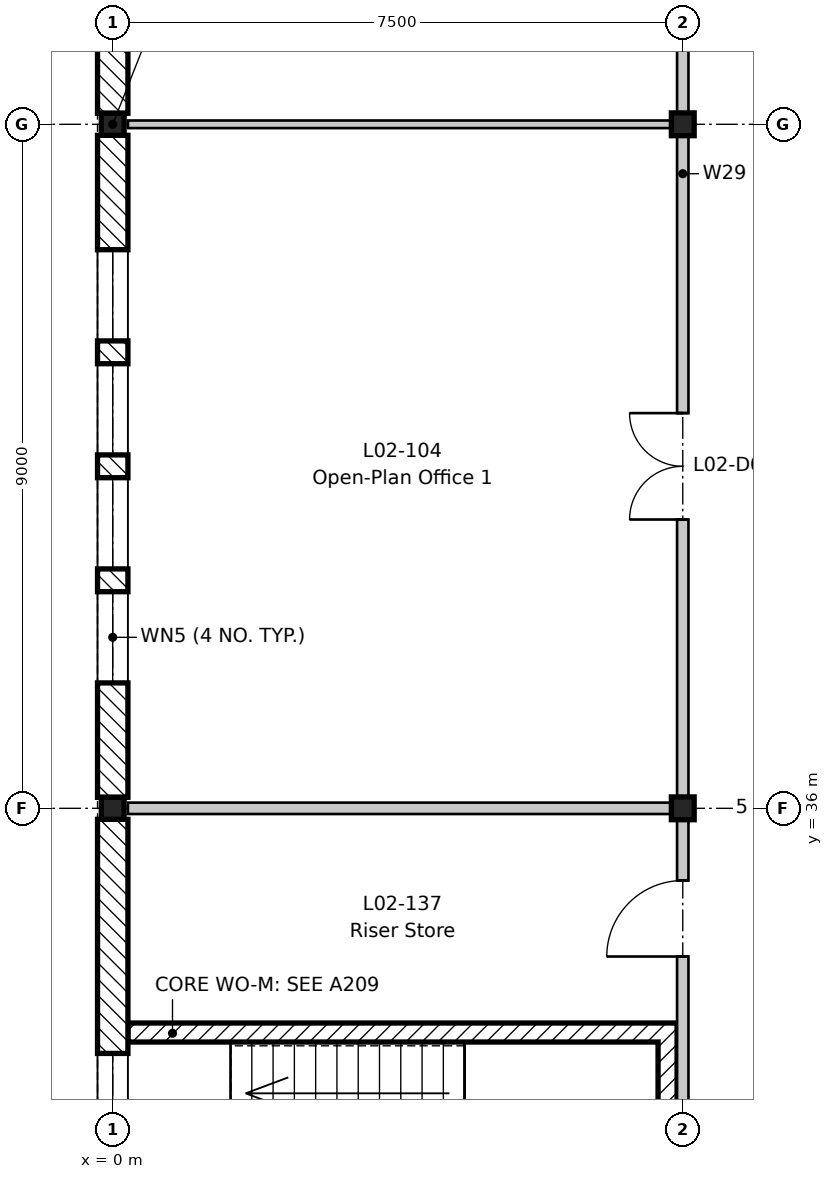
"""IFC4 building model, lengths in metres.
Left out: names, types, materials, properties, quantities, classifications, styles, units other than length and angle.
Written with IfcOpenShell. Run it as: python <this file> out.ifc"""

import sys

from ifc_helpers import new_model, si_unit, direction, frame, frame_2d, origin, origin_2d, place, context, subcontext, project, spatial, rectangle, i_section, extrude, element, fill, save


model = new_model("IFC4")
c1 = context("Model", 3, precision=1e-05, world=origin(), true_north=direction((0.0, 1.0)))
c2 = subcontext(c1, "Body", "Model", "MODEL_VIEW")
j1 = project(units=[si_unit("LENGTHUNIT", "METRE"), si_unit("PLANEANGLEUNIT", "RADIAN")], contexts=[c1])
p1 = place(None, origin())
s1 = spatial("IfcSite", under=j1, at=p1, CompositionType="ELEMENT")
p2 = place(p1, origin())
s2 = spatial("IfcBuilding", under=s1, at=p2, CompositionType="ELEMENT")
p3 = place(p2, frame((0.0, 0.0, 9.9)))
s3 = spatial("IfcBuildingStorey", under=s2, at=p3, CompositionType="ELEMENT", Elevation=9.9)
for number, where, z_axis, x_axis in (
    (1, (0.0, 36.0, -0.2), (0.0, 0.0, 1.0), (1.0, 0.0, 0.0)),
    (2, (0.0, 45.0, -0.2), (0.0, 0.0, 1.0), (1.0, 0.0, 0.0)),
):
    element("IfcColumn", number, at=place(p3, frame(where, z_axis=z_axis, x_axis=x_axis)), inside=s3, PredefinedType="COLUMN", context=c2, shape_type="SweptSolid", body=[
        extrude(i_section(OverallWidth=0.3, OverallDepth=0.29, WebThickness=0.009, FlangeThickness=0.014, FilletRadius=0.027, at=origin_2d()), origin(), (0.0, 0.0, 1.0), 4.5),
    ])
for number, where, z_axis, x_axis in (
    (3, (7.5, 36.0, -0.2), (0.0, 0.0, 1.0), (1.0, 0.0, 0.0)),
    (4, (7.5, 45.0, -0.2), (0.0, 0.0, 1.0), (1.0, 0.0, 0.0)),
):
    element("IfcColumn", number, at=place(p3, frame(where, z_axis=z_axis, x_axis=x_axis)), inside=s3, PredefinedType="COLUMN", context=c2, shape_type="SweptSolid", body=[
        extrude(i_section(OverallWidth=0.3, OverallDepth=0.3, WebThickness=0.011, FlangeThickness=0.019, FilletRadius=0.027, at=origin_2d()), origin(), (0.0, 0.0, 1.0), 4.5),
    ])
p4 = place(p3, frame((0.2, 33.05, 0.0), z_axis=(0.0, 0.0, 1.0), x_axis=(1.0, 0.0, 0.0)))
e5 = element("IfcWall", 5, at=p4, inside=s3, PredefinedType="SHEAR", context=c2, shape_type="SweptSolid", body=[
    extrude(rectangle(XDim=7.225, YDim=0.25, at=frame_2d((3.613, 0.0))), origin(), (0.0, 0.0, 1.0), 4.3),
])
p5 = place(p3, frame((7.3, 30.075, 0.0), z_axis=(0.0, 0.0, 1.0), x_axis=(0.0, 1.0, 0.0)))
e6 = element("IfcWall", 6, at=p5, inside=s3, PredefinedType="SHEAR", context=c2, shape_type="SweptSolid", body=[
    extrude(rectangle(XDim=2.85, YDim=0.25, at=frame_2d((1.425, 0.0))), origin(), (0.0, 0.0, 1.0), 4.3),
])
p6 = place(p3, frame((0.0, 27.145, 0.0), z_axis=(0.0, 0.0, 1.0), x_axis=(0.0, 1.0, 0.0)))
e7 = element("IfcWall", 7, at=p6, inside=s3, PredefinedType="STANDARD", context=c2, shape_type="SweptSolid", body=[
    extrude(rectangle(XDim=8.71, YDim=0.4, at=frame_2d((4.355, 0.0))), origin(), (0.0, 0.0, 1.0), 3.9),
])
p7 = place(p6, frame((3.08, 0.0, 0.9)))
e8 = element("IfcOpeningElement", 8, at=p7, cuts=e7, PredefinedType="OPENING", context=c2, shape_type="SweptSolid", body=[
    extrude(rectangle(XDim=1.05, YDim=2.7, at=frame_2d((0.525, 1.35))), frame((0.0, 0.21, 0.0), z_axis=(0.0, -1.0, 0.0), x_axis=(1.0, 0.0, 0.0)), (0.0, 0.0, 1.0), 0.42),
])
p8 = place(p6, frame((4.58, 0.0, 0.9)))
e9 = element("IfcOpeningElement", 9, at=p8, cuts=e7, PredefinedType="OPENING", context=c2, shape_type="SweptSolid", body=[
    extrude(rectangle(XDim=1.05, YDim=2.7, at=frame_2d((0.525, 1.35))), frame((0.0, 0.21, 0.0), z_axis=(0.0, -1.0, 0.0), x_axis=(1.0, 0.0, 0.0)), (0.0, 0.0, 1.0), 0.42),
])
p9 = place(p3, frame((0.0, 36.145, 0.0), z_axis=(0.0, 0.0, 1.0), x_axis=(0.0, 1.0, 0.0)))
e10 = element("IfcWall", 10, at=p9, inside=s3, PredefinedType="STANDARD", context=c2, shape_type="SweptSolid", body=[
    extrude(rectangle(XDim=8.71, YDim=0.4, at=frame_2d((4.355, 0.0))), origin(), (0.0, 0.0, 1.0), 3.9),
])
p10 = place(p9, frame((1.505, 0.0, 0.6)))
e11 = element("IfcOpeningElement", 11, at=p10, cuts=e10, PredefinedType="OPENING", context=c2, shape_type="SweptSolid", body=[
    extrude(rectangle(XDim=1.2, YDim=3.0, at=frame_2d((0.6, 1.5))), frame((0.0, 0.21, 0.0), z_axis=(0.0, -1.0, 0.0), x_axis=(1.0, 0.0, 0.0)), (0.0, 0.0, 1.0), 0.42),
])
p11 = place(p9, frame((3.005, 0.0, 0.6)))
e12 = element("IfcOpeningElement", 12, at=p11, cuts=e10, PredefinedType="OPENING", context=c2, shape_type="SweptSolid", body=[
    extrude(rectangle(XDim=1.2, YDim=3.0, at=frame_2d((0.6, 1.5))), frame((0.0, 0.21, 0.0), z_axis=(0.0, -1.0, 0.0), x_axis=(1.0, 0.0, 0.0)), (0.0, 0.0, 1.0), 0.42),
])
p12 = place(p9, frame((4.505, 0.0, 0.6)))
e13 = element("IfcOpeningElement", 13, at=p12, cuts=e10, PredefinedType="OPENING", context=c2, shape_type="SweptSolid", body=[
    extrude(rectangle(XDim=1.2, YDim=3.0, at=frame_2d((0.6, 1.5))), frame((0.0, 0.21, 0.0), z_axis=(0.0, -1.0, 0.0), x_axis=(1.0, 0.0, 0.0)), (0.0, 0.0, 1.0), 0.42),
])
p13 = place(p9, frame((6.005, 0.0, 0.6)))
e14 = element("IfcOpeningElement", 14, at=p13, cuts=e10, PredefinedType="OPENING", context=c2, shape_type="SweptSolid", body=[
    extrude(rectangle(XDim=1.2, YDim=3.0, at=frame_2d((0.6, 1.5))), frame((0.0, 0.21, 0.0), z_axis=(0.0, -1.0, 0.0), x_axis=(1.0, 0.0, 0.0)), (0.0, 0.0, 1.0), 0.42),
])
p14 = place(p3, frame((0.0, 45.145, 0.0), z_axis=(0.0, 0.0, 1.0), x_axis=(0.0, 1.0, 0.0)))
e15 = element("IfcWall", 15, at=p14, inside=s3, PredefinedType="STANDARD", context=c2, shape_type="SweptSolid", body=[
    extrude(rectangle(XDim=8.71, YDim=0.4, at=frame_2d((4.355, 0.0))), origin(), (0.0, 0.0, 1.0), 3.9),
])
p15 = place(p3, frame((0.2, 36.0, 0.0), z_axis=(0.0, 0.0, 1.0), x_axis=(1.0, 0.0, 0.0)))
e16 = element("IfcWall", 16, at=p15, inside=s3, PredefinedType="PARTITIONING", context=c2, shape_type="SweptSolid", body=[
    extrude(rectangle(XDim=7.225, YDim=0.15, at=frame_2d((3.613, 0.0))), origin(), (0.0, 0.0, 1.0), 3.95),
])
p16 = place(p3, frame((0.2, 45.0, 0.0), z_axis=(0.0, 0.0, 1.0), x_axis=(1.0, 0.0, 0.0)))
e17 = element("IfcWall", 17, at=p16, inside=s3, PredefinedType="PARTITIONING", context=c2, shape_type="SweptSolid", body=[
    extrude(rectangle(XDim=7.225, YDim=0.1, at=frame_2d((3.613, 0.0))), origin(), (0.0, 0.0, 1.0), 3.95),
])
p17 = place(p3, frame((7.5, -8.8, 0.0), z_axis=(0.0, 0.0, 1.0), x_axis=(0.0, 1.0, 0.0)))
e18 = element("IfcWall", 18, at=p17, inside=s3, PredefinedType="PARTITIONING", context=c2, shape_type="SweptSolid", body=[
    extrude(rectangle(XDim=79.3, YDim=0.15, at=frame_2d((39.65, 0.0))), origin(), (0.0, 0.0, 1.0), 3.78),
])
p18 = place(p17, frame((21.6, 0.0, 0.0)))
e19 = element("IfcOpeningElement", 19, at=p18, cuts=e18, PredefinedType="OPENING", context=c2, shape_type="SweptSolid", body=[
    extrude(rectangle(XDim=1.4, YDim=2.1, at=frame_2d((0.7, 1.05))), frame((0.0, 0.085, 0.0), z_axis=(0.0, -1.0, 0.0), x_axis=(1.0, 0.0, 0.0)), (0.0, 0.0, 1.0), 0.17),
])
p19 = place(p17, frame((29.3, 0.0, 0.0)))
e20 = element("IfcOpeningElement", 20, at=p19, cuts=e18, PredefinedType="OPENING", context=c2, shape_type="SweptSolid", body=[
    extrude(rectangle(XDim=1.0, YDim=2.1, at=frame_2d((0.5, 1.05))), frame((0.0, 0.085, 0.0), z_axis=(0.0, -1.0, 0.0), x_axis=(1.0, 0.0, 0.0)), (0.0, 0.0, 1.0), 0.17),
])
p20 = place(p17, frame((33.8, 0.0, 0.0)))
e21 = element("IfcOpeningElement", 21, at=p20, cuts=e18, PredefinedType="OPENING", context=c2, shape_type="SweptSolid", body=[
    extrude(rectangle(XDim=1.0, YDim=2.1, at=frame_2d((0.5, 1.05))), frame((0.0, 0.085, 0.0), z_axis=(0.0, -1.0, 0.0), x_axis=(1.0, 0.0, 0.0)), (0.0, 0.0, 1.0), 0.17),
])
p21 = place(p17, frame((48.6, 0.0, 0.0)))
e22 = element("IfcOpeningElement", 22, at=p21, cuts=e18, PredefinedType="OPENING", context=c2, shape_type="SweptSolid", body=[
    extrude(rectangle(XDim=1.4, YDim=2.1, at=frame_2d((0.7, 1.05))), frame((0.0, 0.085, 0.0), z_axis=(0.0, -1.0, 0.0), x_axis=(1.0, 0.0, 0.0)), (0.0, 0.0, 1.0), 0.17),
])
p22 = place(p17, frame((56.3, 0.0, 0.0)))
e23 = element("IfcOpeningElement", 23, at=p22, cuts=e18, PredefinedType="OPENING", context=c2, shape_type="SweptSolid", body=[
    extrude(rectangle(XDim=1.0, YDim=2.1, at=frame_2d((0.5, 1.05))), frame((0.0, 0.085, 0.0), z_axis=(0.0, -1.0, 0.0), x_axis=(1.0, 0.0, 0.0)), (0.0, 0.0, 1.0), 0.17),
])
p23 = place(p17, frame((60.8, 0.0, 0.0)))
e24 = element("IfcOpeningElement", 24, at=p23, cuts=e18, PredefinedType="OPENING", context=c2, shape_type="SweptSolid", body=[
    extrude(rectangle(XDim=1.0, YDim=2.1, at=frame_2d((0.5, 1.05))), frame((0.0, 0.085, 0.0), z_axis=(0.0, -1.0, 0.0), x_axis=(1.0, 0.0, 0.0)), (0.0, 0.0, 1.0), 0.17),
])
p24 = place(p17, frame((12.6, 0.0, 0.0)))
e25 = element("IfcOpeningElement", 25, at=p24, cuts=e18, PredefinedType="OPENING", context=c2, shape_type="SweptSolid", body=[
    extrude(rectangle(XDim=1.4, YDim=2.1, at=frame_2d((0.7, 1.05))), frame((0.0, 0.085, 0.0), z_axis=(0.0, -1.0, 0.0), x_axis=(1.0, 0.0, 0.0)), (0.0, 0.0, 1.0), 0.17),
])
p25 = place(p17, frame((3.6, 0.0, 0.0)))
e26 = element("IfcOpeningElement", 26, at=p25, cuts=e18, PredefinedType="OPENING", context=c2, shape_type="SweptSolid", body=[
    extrude(rectangle(XDim=1.4, YDim=2.1, at=frame_2d((0.7, 1.05))), frame((0.0, 0.085, 0.0), z_axis=(0.0, -1.0, 0.0), x_axis=(1.0, 0.0, 0.0)), (0.0, 0.0, 1.0), 0.17),
])
p26 = place(p17, frame((63.55, 0.0, 0.0)))
e27 = element("IfcOpeningElement", 27, at=p26, cuts=e18, PredefinedType="OPENING", context=c2, shape_type="SweptSolid", body=[
    extrude(rectangle(XDim=1.4, YDim=2.1, at=frame_2d((0.7, 1.05))), frame((0.0, 0.085, 0.0), z_axis=(0.0, -1.0, 0.0), x_axis=(1.0, 0.0, 0.0)), (0.0, 0.0, 1.0), 0.17),
])
p27 = place(p17, frame((69.6, 0.0, 0.0)))
e28 = element("IfcOpeningElement", 28, at=p27, cuts=e18, PredefinedType="OPENING", context=c2, shape_type="SweptSolid", body=[
    extrude(rectangle(XDim=1.4, YDim=2.1, at=frame_2d((0.7, 1.05))), frame((0.0, 0.085, 0.0), z_axis=(0.0, -1.0, 0.0), x_axis=(1.0, 0.0, 0.0)), (0.0, 0.0, 1.0), 0.17),
])
p28 = place(p17, frame((42.85, 0.0, 0.0)))
e29 = element("IfcOpeningElement", 29, at=p28, cuts=e18, PredefinedType="OPENING", context=c2, shape_type="SweptSolid", body=[
    extrude(rectangle(XDim=1.0, YDim=2.1, at=frame_2d((0.5, 1.05))), frame((0.0, 0.085, 0.0), z_axis=(0.0, -1.0, 0.0), x_axis=(1.0, 0.0, 0.0)), (0.0, 0.0, 1.0), 0.17),
])
p29 = place(p17, frame((36.55, 0.0, 0.0)))
e30 = element("IfcOpeningElement", 30, at=p29, cuts=e18, PredefinedType="OPENING", context=c2, shape_type="SweptSolid", body=[
    extrude(rectangle(XDim=1.4, YDim=2.1, at=frame_2d((0.7, 1.05))), frame((0.0, 0.085, 0.0), z_axis=(0.0, -1.0, 0.0), x_axis=(1.0, 0.0, 0.0)), (0.0, 0.0, 1.0), 0.17),
])
p30 = place(p17, frame((72.8, 0.0, 0.0)))
e31 = element("IfcOpeningElement", 31, at=p30, cuts=e18, PredefinedType="OPENING", context=c2, shape_type="SweptSolid", body=[
    extrude(rectangle(XDim=1.0, YDim=2.1, at=frame_2d((0.5, 1.05))), frame((0.0, 0.085, 0.0), z_axis=(0.0, -1.0, 0.0), x_axis=(1.0, 0.0, 0.0)), (0.0, 0.0, 1.0), 0.17),
])
p31 = place(p8, origin())
e32 = element("IfcWindow", 32, at=p31, inside=s3, PartitioningType="SINGLE_PANEL", PredefinedType="WINDOW", context=c2, shape_type="SweptSolid", body=[
    extrude(rectangle(XDim=1.05, YDim=2.7, at=frame_2d((0.525, 1.35))), frame((0.0, 0.03, 0.0), z_axis=(0.0, -1.0, 0.0), x_axis=(1.0, 0.0, 0.0)), (0.0, 0.0, 1.0), 0.06),
])
fill(e9, e32)
p32 = place(p10, origin())
e33 = element("IfcWindow", 33, at=p32, inside=s3, PartitioningType="SINGLE_PANEL", PredefinedType="WINDOW", context=c2, shape_type="SweptSolid", body=[
    extrude(rectangle(XDim=1.2, YDim=3.0, at=frame_2d((0.6, 1.5))), frame((0.0, 0.03, 0.0), z_axis=(0.0, -1.0, 0.0), x_axis=(1.0, 0.0, 0.0)), (0.0, 0.0, 1.0), 0.06),
])
fill(e11, e33)
p33 = place(p11, origin())
e34 = element("IfcWindow", 34, at=p33, inside=s3, PartitioningType="SINGLE_PANEL", PredefinedType="WINDOW", context=c2, shape_type="SweptSolid", body=[
    extrude(rectangle(XDim=1.2, YDim=3.0, at=frame_2d((0.6, 1.5))), frame((0.0, 0.03, 0.0), z_axis=(0.0, -1.0, 0.0), x_axis=(1.0, 0.0, 0.0)), (0.0, 0.0, 1.0), 0.06),
])
fill(e12, e34)
p34 = place(p12, origin())
e35 = element("IfcWindow", 35, at=p34, inside=s3, PartitioningType="SINGLE_PANEL", PredefinedType="WINDOW", context=c2, shape_type="SweptSolid", body=[
    extrude(rectangle(XDim=1.2, YDim=3.0, at=frame_2d((0.6, 1.5))), frame((0.0, 0.03, 0.0), z_axis=(0.0, -1.0, 0.0), x_axis=(1.0, 0.0, 0.0)), (0.0, 0.0, 1.0), 0.06),
])
fill(e13, e35)
p35 = place(p13, origin())
e36 = element("IfcWindow", 36, at=p35, inside=s3, PartitioningType="SINGLE_PANEL", PredefinedType="WINDOW", context=c2, shape_type="SweptSolid", body=[
    extrude(rectangle(XDim=1.2, YDim=3.0, at=frame_2d((0.6, 1.5))), frame((0.0, 0.03, 0.0), z_axis=(0.0, -1.0, 0.0), x_axis=(1.0, 0.0, 0.0)), (0.0, 0.0, 1.0), 0.06),
])
fill(e14, e36)
p36 = place(p21, origin())
e37 = element("IfcDoor", 37, at=p36, inside=s3, OperationType="DOUBLE_DOOR_SINGLE_SWING", PredefinedType="DOOR", context=c2, shape_type="SweptSolid", body=[
    extrude(rectangle(XDim=1.4, YDim=2.1, at=frame_2d((0.7, 1.05))), frame((0.0, 0.025, 0.0), z_axis=(0.0, -1.0, 0.0), x_axis=(1.0, 0.0, 0.0)), (0.0, 0.0, 1.0), 0.05),
])
fill(e22, e37)
p37 = place(p28, origin())
e38 = element("IfcDoor", 38, at=p37, inside=s3, OperationType="SINGLE_SWING_LEFT", PredefinedType="DOOR", context=c2, shape_type="SweptSolid", body=[
    extrude(rectangle(XDim=1.0, YDim=2.1, at=frame_2d((0.5, 1.05))), frame((0.0, 0.025, 0.0), z_axis=(0.0, -1.0, 0.0), x_axis=(1.0, 0.0, 0.0)), (0.0, 0.0, 1.0), 0.05),
])
fill(e29, e38)
save(model, sys.argv[1])
